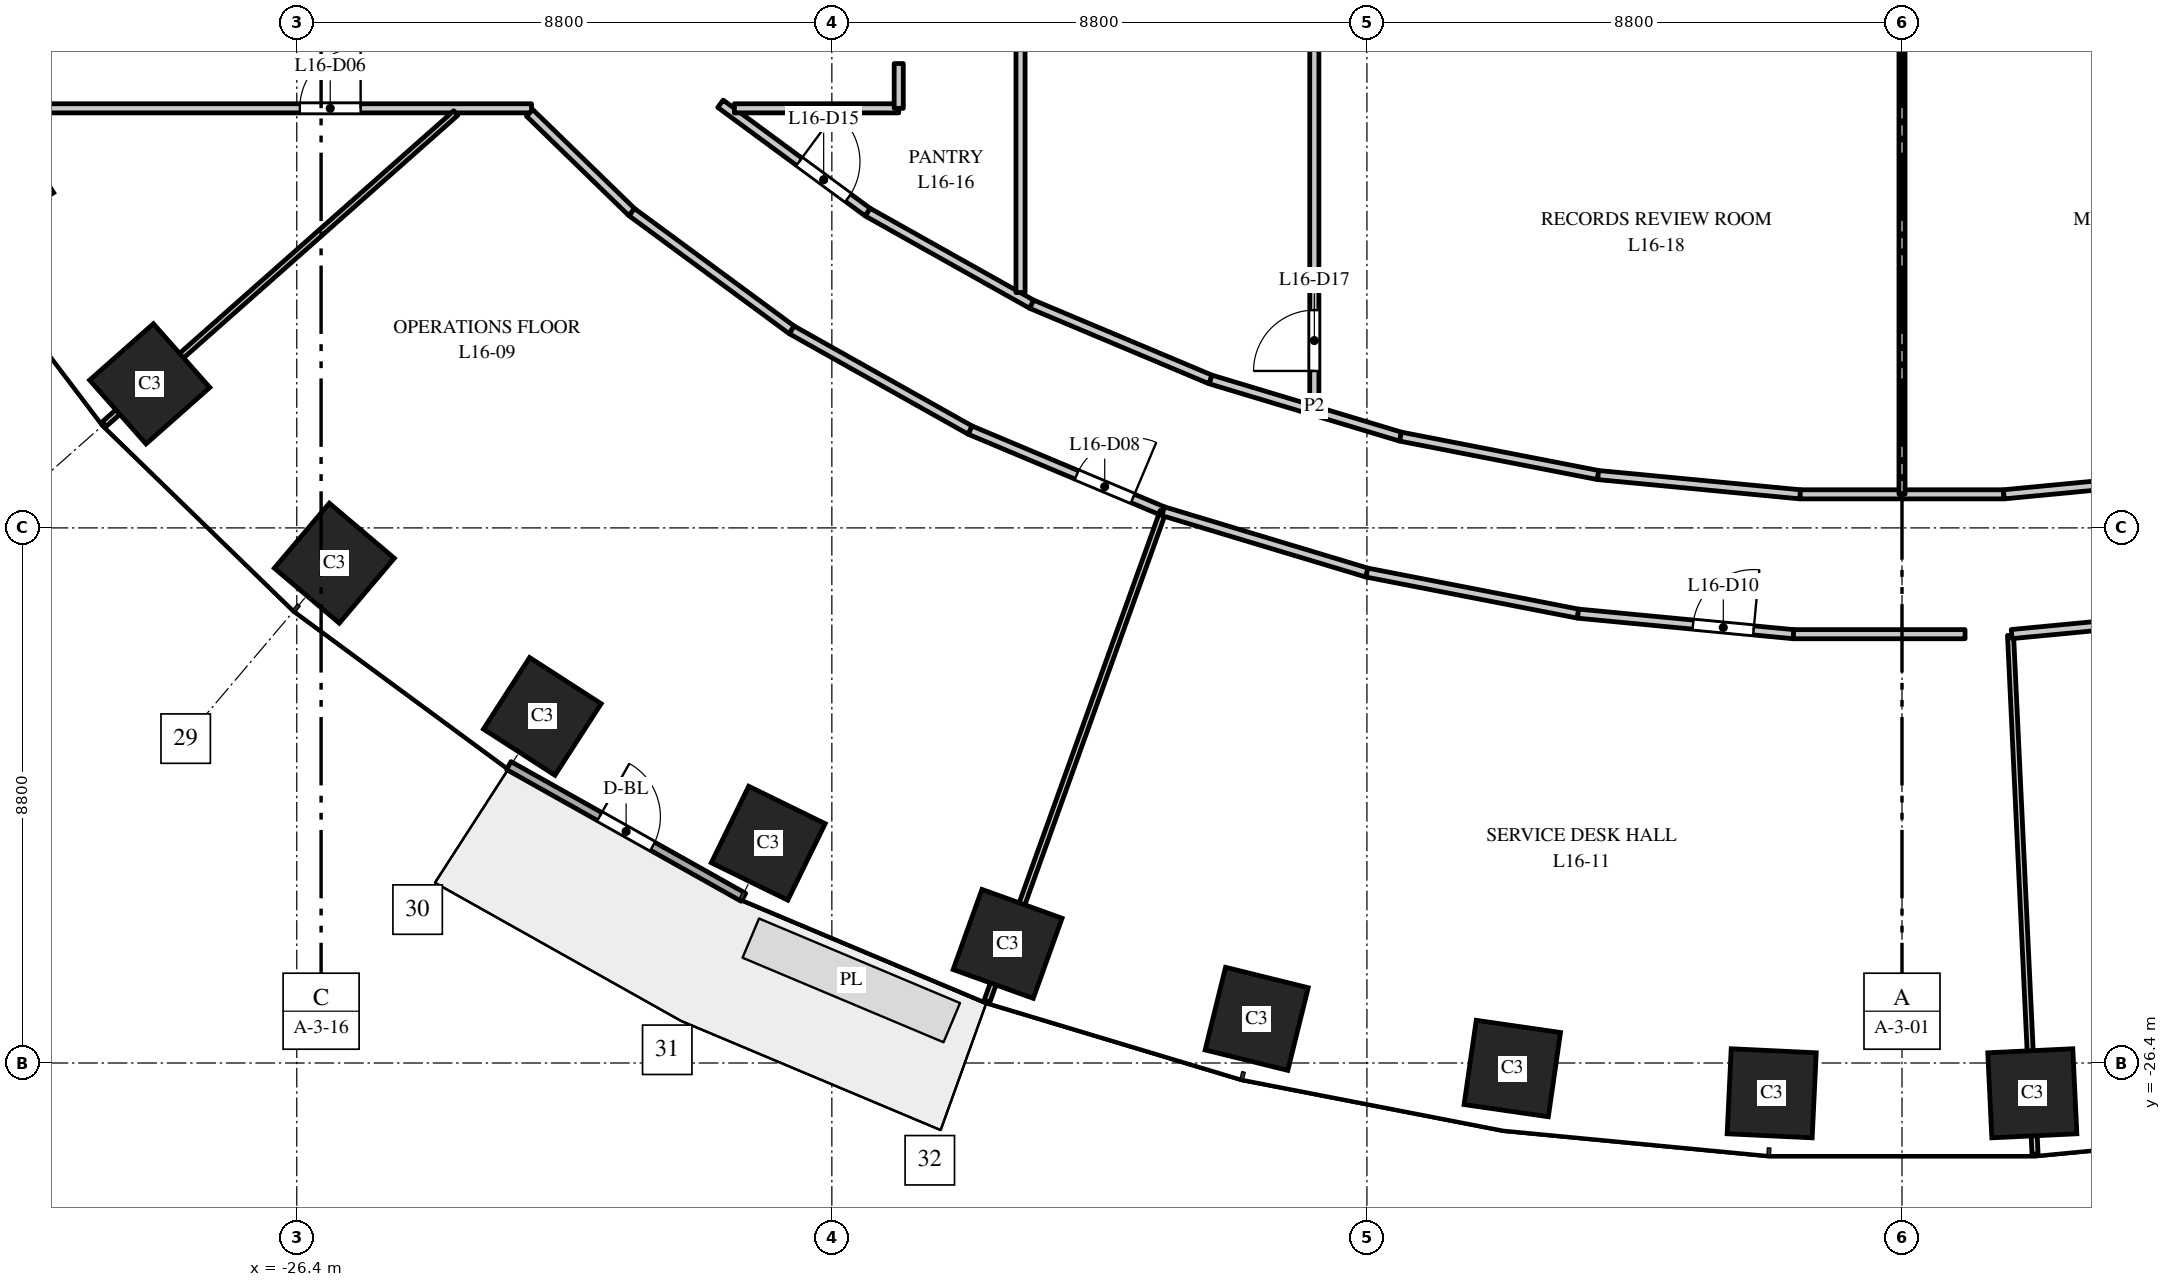
"""IFC4 building model, lengths in metres.
Left out: names, types, materials, properties, quantities, classifications, styles, units other than length and angle.
Written with IfcOpenShell. Run it as: python <this file> out.ifc"""

import sys

from ifc_helpers import new_model, si_unit, direction, frame, frame_2d, origin, origin_2d, place, context, subcontext, project, spatial, rectangle, extrude, element, fill, save


model = new_model("IFC4")
c1 = context("Model", 3, precision=1e-05, world=origin(), true_north=direction((0.0, 1.0)))
c2 = subcontext(c1, "Body", "Model", "MODEL_VIEW")
j1 = project(units=[si_unit("LENGTHUNIT", "METRE"), si_unit("PLANEANGLEUNIT", "RADIAN")], contexts=[c1])
p1 = place(None, origin())
s1 = spatial("IfcSite", under=j1, at=p1, CompositionType="ELEMENT")
p2 = place(p1, origin())
s2 = spatial("IfcBuilding", under=s1, at=p2, CompositionType="ELEMENT")
p3 = place(p2, frame((0.0, 0.0, 74.5)))
s3 = spatial("IfcBuildingStorey", under=s2, at=p3, CompositionType="ELEMENT", Elevation=74.5)
for number, where, z_axis, x_axis in (
    (1, (-31.365, -11.871, 0.0), (0.0, 0.0, 1.0), (0.535, -0.845, 0.0)),
    (2, (-28.819, -15.23, 0.0), (0.0, 0.0, 1.0), (0.663, -0.749, 0.0)),
    (3, (-25.783, -18.18, 0.0), (0.0, 0.0, 1.0), (0.763, -0.646, 0.0)),
    (4, (-22.362, -20.7, 0.0), (0.0, 0.0, 1.0), (0.84, -0.542, 0.0)),
    (5, (-18.646, -22.785, 0.0), (0.0, 0.0, 1.0), (0.898, -0.439, 0.0)),
    (6, (-14.709, -24.441, 0.0), (0.0, 0.0, 1.0), (0.941, -0.338, 0.0)),
    (7, (-10.613, -25.674, 0.0), (0.0, 0.0, 1.0), (0.971, -0.24, 0.0)),
    (8, (-6.409, -26.491, 0.0), (0.0, 0.0, 1.0), (0.99, -0.143, 0.0)),
    (9, (-2.143, -26.898, 0.0), (0.0, 0.0, 1.0), (0.999, -0.048, 0.0)),
    (10, (2.143, -26.898, 0.0), (0.0, 0.0, 1.0), (0.999, 0.048, 0.0)),
):
    element("IfcColumn", number, at=place(p3, frame(where, z_axis=z_axis, x_axis=x_axis)), inside=s3, PredefinedType="COLUMN", context=c2, shape_type="SweptSolid", body=[
        extrude(rectangle(XDim=1.4, YDim=1.4, at=origin_2d()), origin(), (0.0, 0.0, 1.0), 4.0),
    ])
p4 = place(p3, frame((-22.913, -21.509, 0.0), z_axis=(0.0, 0.0, 1.0), x_axis=(0.872046572975, -0.489422899509, 0.0)))
e11 = element("IfcWall", 11, at=p4, inside=s3, PredefinedType="STANDARD", context=c2, shape_type="SweptSolid", body=[
    extrude(rectangle(XDim=4.426, YDim=0.15, at=frame_2d((2.213, 0.0))), origin(), (0.0, 0.0, 1.0), 3.7),
])
p5 = place(p4, frame((1.713, 0.0, 0.0)))
e12 = element("IfcOpeningElement", 12, at=p5, cuts=e11, PredefinedType="OPENING", context=c2, shape_type="SweptSolid", body=[
    extrude(rectangle(XDim=1.0, YDim=2.4, at=frame_2d((0.5, 1.2))), frame((0.0, 0.085, 0.0), z_axis=(0.0, -1.0, 0.0), x_axis=(1.0, 0.0, 0.0)), (0.0, 0.0, 1.0), 0.17),
])
p6 = place(p3, frame((-31.5, -10.7, 0.0), z_axis=(0.0, 0.0, 1.0), x_axis=(1.0, 0.0, 0.0)))
e13 = element("IfcWall", 13, at=p6, inside=s3, PredefinedType="PARTITIONING", context=c2, shape_type="SweptSolid", body=[
    extrude(rectangle(XDim=8.961, YDim=0.15, at=frame_2d((4.48, 0.0))), origin(), (0.0, 0.0, 1.0), 3.1),
])
p7 = place(p6, frame((5.15, 0.0, 0.0)))
e14 = element("IfcOpeningElement", 14, at=p7, cuts=e13, PredefinedType="OPENING", context=c2, shape_type="SweptSolid", body=[
    extrude(rectangle(XDim=1.0, YDim=2.1, at=frame_2d((0.5, 1.05))), frame((0.0, 0.085, 0.0), z_axis=(0.0, -1.0, 0.0), x_axis=(1.0, 0.0, 0.0)), (0.0, 0.0, 1.0), 0.17),
])
p8 = place(p3, frame((-29.569, -15.895, 0.0), z_axis=(0.0, 0.0, 1.0), x_axis=(0.748985701008, 0.662586160198, 0.0)))
e15 = element("IfcWall", 15, at=p8, inside=s3, PredefinedType="PARTITIONING", context=c2, shape_type="SweptSolid", body=[
    extrude(rectangle(XDim=7.723, YDim=0.1, at=frame_2d((3.861, 0.0))), origin(), (0.0, 0.0, 1.0), 2.85),
])
p9 = place(p3, frame((-22.57, -10.775, 0.0), z_axis=(0.0, 0.0, 1.0), x_axis=(0.717045582263, -0.697026278527, 0.0)))
e16 = element("IfcWall", 16, at=p9, inside=s3, PredefinedType="PARTITIONING", context=c2, shape_type="SweptSolid", body=[
    extrude(rectangle(XDim=2.342, YDim=0.15, at=frame_2d((1.171, 0.0))), origin(), (0.0, 0.0, 1.0), 3.7),
])
p10 = place(p3, frame((-20.891, -12.407, 0.0), z_axis=(0.0, 0.0, 1.0), x_axis=(0.805303685339, -0.592862525701, 0.0)))
e17 = element("IfcWall", 17, at=p10, inside=s3, PredefinedType="PARTITIONING", context=c2, shape_type="SweptSolid", body=[
    extrude(rectangle(XDim=3.267, YDim=0.15, at=frame_2d((1.634, 0.0))), origin(), (0.0, 0.0, 1.0), 2.75),
])
p11 = place(p3, frame((-19.432, -10.625, 0.0), z_axis=(0.0, 0.0, 1.0), x_axis=(0.805306738654, -0.592858378265, 0.0)))
e18 = element("IfcWall", 18, at=p11, inside=s3, PredefinedType="PARTITIONING", context=c2, shape_type="SweptSolid", body=[
    extrude(rectangle(XDim=3.007, YDim=0.15, at=frame_2d((1.504, 0.0))), origin(), (0.0, 0.0, 1.0), 2.75),
])
p12 = place(p11, frame((1.607, 0.0, 0.0)))
e19 = element("IfcOpeningElement", 19, at=p12, cuts=e18, PredefinedType="OPENING", context=c2, shape_type="SweptSolid", body=[
    extrude(rectangle(XDim=1.0, YDim=2.1, at=frame_2d((0.5, 1.05))), frame((0.0, 0.085, 0.0), z_axis=(0.0, -1.0, 0.0), x_axis=(1.0, 0.0, 0.0)), (0.0, 0.0, 1.0), 0.17),
])
p13 = place(p3, frame((-19.203, -10.7, 0.0), z_axis=(0.0, 0.0, 1.0), x_axis=(1.0, 0.0, 0.0)))
e20 = element("IfcWall", 20, at=p13, inside=s3, PredefinedType="PARTITIONING", context=c2, shape_type="SweptSolid", body=[
    extrude(rectangle(XDim=2.703, YDim=0.15, at=frame_2d((1.352, 0.0))), origin(), (0.0, 0.0, 1.0), 3.7),
])
p14 = place(p3, frame((-18.26, -14.344, 0.0), z_axis=(0.0, 0.0, 1.0), x_axis=(0.871958798398, -0.489579262118, 0.0)))
e21 = element("IfcWall", 21, at=p14, inside=s3, PredefinedType="PARTITIONING", context=c2, shape_type="SweptSolid", body=[
    extrude(rectangle(XDim=3.366, YDim=0.15, at=frame_2d((1.683, 0.0))), origin(), (0.0, 0.0, 1.0), 3.7),
])
p15 = place(p3, frame((-17.01, -12.408, 0.0), z_axis=(0.0, 0.0, 1.0), x_axis=(0.871977874087, -0.489545286059, 0.0)))
e22 = element("IfcWall", 22, at=p15, inside=s3, PredefinedType="PARTITIONING", context=c2, shape_type="SweptSolid", body=[
    extrude(rectangle(XDim=3.093, YDim=0.15, at=frame_2d((1.546, 0.0))), origin(), (0.0, 0.0, 1.0), 3.7),
])
p16 = place(p3, frame((-16.5, -10.7, 0.0), z_axis=(0.0, 0.0, 1.0), x_axis=(0.0, 1.0, 0.0)))
e23 = element("IfcWall", 23, at=p16, inside=s3, PredefinedType="PARTITIONING", context=c2, shape_type="SweptSolid", body=[
    extrude(rectangle(XDim=0.736, YDim=0.15, at=frame_2d((0.368, 0.0))), origin(), (0.0, 0.0, 1.0), 3.7),
])
p17 = place(p3, frame((-15.325, -15.992, 0.0), z_axis=(0.0, 0.0, 1.0), x_axis=(0.921891448612, -0.387448263612, 0.0)))
e24 = element("IfcWall", 24, at=p17, inside=s3, PredefinedType="PARTITIONING", context=c2, shape_type="SweptSolid", body=[
    extrude(rectangle(XDim=3.443, YDim=0.15, at=frame_2d((1.722, 0.0))), origin(), (0.0, 0.0, 1.0), 2.85),
])
p18 = place(p17, frame((1.9, 0.0, 0.0)))
e25 = element("IfcOpeningElement", 25, at=p18, cuts=e24, PredefinedType="OPENING", context=c2, shape_type="SweptSolid", body=[
    extrude(rectangle(XDim=1.0, YDim=2.1, at=frame_2d((0.5, 1.05))), frame((0.0, 0.085, 0.0), z_axis=(0.0, -1.0, 0.0), x_axis=(1.0, 0.0, 0.0)), (0.0, 0.0, 1.0), 0.17),
])
p19 = place(p3, frame((-15.048, -25.383, 0.0), z_axis=(0.0, 0.0, 1.0), x_axis=(0.338300183564, 0.941038248851, 0.0)))
e26 = element("IfcWall", 26, at=p19, inside=s3, PredefinedType="PARTITIONING", context=c2, shape_type="SweptSolid", body=[
    extrude(rectangle(XDim=8.558, YDim=0.1, at=frame_2d((4.279, 0.0))), origin(), (0.0, 0.0, 1.0), 2.85),
])
p20 = place(p3, frame((-14.497, -13.729, 0.0), z_axis=(0.0, 0.0, 1.0), x_axis=(0.0, 1.0, 0.0)))
e27 = element("IfcWall", 27, at=p20, inside=s3, PredefinedType="PARTITIONING", context=c2, shape_type="SweptSolid", body=[
    extrude(rectangle(XDim=4.654, YDim=0.15, at=frame_2d((2.327, 0.0))), origin(), (0.0, 0.0, 1.0), 2.75),
])
p21 = place(p3, frame((-14.313, -13.922, 0.0), z_axis=(0.0, 0.0, 1.0), x_axis=(0.921799502591, -0.387666966638, 0.0)))
e28 = element("IfcWall", 28, at=p21, inside=s3, PredefinedType="PARTITIONING", context=c2, shape_type="SweptSolid", body=[
    extrude(rectangle(XDim=3.19, YDim=0.15, at=frame_2d((1.595, 0.0))), origin(), (0.0, 0.0, 1.0), 2.85),
])
p22 = place(p3, frame((-12.151, -17.326, 0.0), z_axis=(0.0, 0.0, 1.0), x_axis=(0.957528149021, -0.288339806186, 0.0)))
e29 = element("IfcWall", 29, at=p22, inside=s3, PredefinedType="PARTITIONING", context=c2, shape_type="SweptSolid", body=[
    extrude(rectangle(XDim=3.5, YDim=0.15, at=frame_2d((1.75, 0.0))), origin(), (0.0, 0.0, 1.0), 3.7),
])
p23 = place(p3, frame((-11.372, -15.159, 0.0), z_axis=(0.0, 0.0, 1.0), x_axis=(0.95757464185, -0.28818536619, 0.0)))
e30 = element("IfcWall", 30, at=p23, inside=s3, PredefinedType="PARTITIONING", context=c2, shape_type="SweptSolid", body=[
    extrude(rectangle(XDim=3.262, YDim=0.15, at=frame_2d((1.631, 0.0))), origin(), (0.0, 0.0, 1.0), 3.7),
])
p24 = place(p3, frame((-9.665, -15.591, 0.0), z_axis=(0.0, 0.0, 1.0), x_axis=(0.0, 1.0, 0.0)))
e31 = element("IfcWall", 31, at=p24, inside=s3, PredefinedType="PARTITIONING", context=c2, shape_type="SweptSolid", body=[
    extrude(rectangle(XDim=31.182, YDim=0.15, at=frame_2d((15.591, 0.0))), origin(), (0.0, 0.0, 1.0), 2.75),
])
p25 = place(p24, frame((0.572, 0.0, 0.0)))
e32 = element("IfcOpeningElement", 32, at=p25, cuts=e31, PredefinedType="OPENING", context=c2, shape_type="SweptSolid", body=[
    extrude(rectangle(XDim=1.0, YDim=2.1, at=frame_2d((0.5, 1.05))), frame((0.0, 0.085, 0.0), z_axis=(0.0, -1.0, 0.0), x_axis=(1.0, 0.0, 0.0)), (0.0, 0.0, 1.0), 0.17),
])
p26 = place(p3, frame((-8.8, -18.335, 0.0), z_axis=(0.0, 0.0, 1.0), x_axis=(0.981620418387, -0.190843795306, 0.0)))
e33 = element("IfcWall", 33, at=p26, inside=s3, PredefinedType="PARTITIONING", context=c2, shape_type="SweptSolid", body=[
    extrude(rectangle(XDim=3.537, YDim=0.15, at=frame_2d((1.769, 0.0))), origin(), (0.0, 0.0, 1.0), 2.85),
])
p27 = place(p3, frame((-8.248, -16.099, 0.0), z_axis=(0.0, 0.0, 1.0), x_axis=(0.981621529558, -0.190838079815, 0.0)))
e34 = element("IfcWall", 34, at=p27, inside=s3, PredefinedType="PARTITIONING", context=c2, shape_type="SweptSolid", body=[
    extrude(rectangle(XDim=3.311, YDim=0.15, at=frame_2d((1.655, 0.0))), origin(), (0.0, 0.0, 1.0), 2.85),
])
p28 = place(p3, frame((-5.328, -19.01, 0.0), z_axis=(0.0, 0.0, 1.0), x_axis=(0.995485604231, -0.094912653366, 0.0)))
e35 = element("IfcWall", 35, at=p28, inside=s3, PredefinedType="PARTITIONING", context=c2, shape_type="SweptSolid", body=[
    extrude(rectangle(XDim=3.56, YDim=0.15, at=frame_2d((1.78, 0.0))), origin(), (0.0, 0.0, 1.0), 3.7),
])
p29 = place(p28, frame((1.9, 0.0, 0.0)))
e36 = element("IfcOpeningElement", 36, at=p29, cuts=e35, PredefinedType="OPENING", context=c2, shape_type="SweptSolid", body=[
    extrude(rectangle(XDim=1.0, YDim=2.1, at=frame_2d((0.5, 1.05))), frame((0.0, 0.085, 0.0), z_axis=(0.0, -1.0, 0.0), x_axis=(1.0, 0.0, 0.0)), (0.0, 0.0, 1.0), 0.17),
])
p30 = place(p3, frame((-4.998, -16.731, 0.0), z_axis=(0.0, 0.0, 1.0), x_axis=(0.995479356205, -0.094978162593, 0.0)))
e37 = element("IfcWall", 37, at=p30, inside=s3, PredefinedType="PARTITIONING", context=c2, shape_type="SweptSolid", body=[
    extrude(rectangle(XDim=3.339, YDim=0.15, at=frame_2d((1.669, 0.0))), origin(), (0.0, 0.0, 1.0), 3.7),
])
p31 = place(p3, frame((-1.784, -19.348, 0.0), z_axis=(0.0, 0.0, 1.0), x_axis=(1.0, 0.0, 0.0)))
e38 = element("IfcWall", 38, at=p31, inside=s3, PredefinedType="PARTITIONING", context=c2, shape_type="SweptSolid", body=[
    extrude(rectangle(XDim=2.821, YDim=0.15, at=frame_2d((1.411, 0.0))), origin(), (0.0, 0.0, 1.0), 2.85),
])
p32 = place(p3, frame((-1.674, -17.048, 0.0), z_axis=(0.0, 0.0, 1.0), x_axis=(1.0, 0.0, 0.0)))
e39 = element("IfcWall", 39, at=p32, inside=s3, PredefinedType="PARTITIONING", context=c2, shape_type="SweptSolid", body=[
    extrude(rectangle(XDim=1.654, YDim=0.15, at=frame_2d((0.827, 0.0))), origin(), (0.0, 0.0, 1.0), 2.85),
])
p33 = place(p3, frame((0.0, -17.048, 0.0), z_axis=(0.0, 0.0, 1.0), x_axis=(1.0, 0.0, 0.0)))
e40 = element("IfcWall", 40, at=p33, inside=s3, PredefinedType="PARTITIONING", context=c2, shape_type="SweptSolid", body=[
    extrude(rectangle(XDim=1.674, YDim=0.15, at=frame_2d((0.837, 0.0))), origin(), (0.0, 0.0, 1.0), 3.7),
])
p34 = place(p3, frame((0.0, -17.044, 0.0), z_axis=(0.0, 0.0, 1.0), x_axis=(0.0, 1.0, 0.0)))
e41 = element("IfcWall", 41, at=p34, inside=s3, PredefinedType="PARTITIONING", context=c2, shape_type="SweptSolid", body=[
    extrude(rectangle(XDim=9.54, YDim=0.1, at=frame_2d((4.77, 0.0))), origin(), (0.0, 0.0, 1.0), 3.7),
])
p35 = place(p3, frame((1.674, -17.048, 0.0), z_axis=(0.0, 0.0, 1.0), x_axis=(0.995479356205, 0.094978162593, 0.0)))
e42 = element("IfcWall", 42, at=p35, inside=s3, PredefinedType="PARTITIONING", context=c2, shape_type="SweptSolid", body=[
    extrude(rectangle(XDim=3.339, YDim=0.15, at=frame_2d((1.669, 0.0))), origin(), (0.0, 0.0, 1.0), 2.85),
])
p36 = place(p3, frame((1.785, -19.366, 0.0), z_axis=(0.0, 0.0, 1.0), x_axis=(0.047190335266, -0.998885915537, 0.0)))
e43 = element("IfcWall", 43, at=p36, inside=s3, PredefinedType="PARTITIONING", context=c2, shape_type="SweptSolid", body=[
    extrude(rectangle(XDim=8.542, YDim=0.1, at=frame_2d((4.271, 0.0))), origin(), (0.0, 0.0, 1.0), 2.85),
])
p37 = place(p3, frame((1.804, -19.346, 0.0), z_axis=(0.0, 0.0, 1.0), x_axis=(0.99548678928, 0.094900223226, 0.0)))
e44 = element("IfcWall", 44, at=p37, inside=s3, PredefinedType="PARTITIONING", context=c2, shape_type="SweptSolid", body=[
    extrude(rectangle(XDim=3.54, YDim=0.15, at=frame_2d((1.77, 0.0))), origin(), (0.0, 0.0, 1.0), 2.85),
])
p38 = place(p5, origin())
e45 = element("IfcDoor", 45, at=p38, inside=s3, OperationType="SINGLE_SWING_LEFT", PredefinedType="DOOR", context=c2, shape_type="SweptSolid", body=[
    extrude(rectangle(XDim=1.0, YDim=2.4, at=frame_2d((0.5, 1.2))), frame((0.0, 0.025, 0.0), z_axis=(0.0, -1.0, 0.0), x_axis=(1.0, 0.0, 0.0)), (0.0, 0.0, 1.0), 0.05),
])
fill(e12, e45)
p39 = place(p7, origin())
e46 = element("IfcDoor", 46, at=p39, inside=s3, OperationType="SINGLE_SWING_RIGHT", PredefinedType="DOOR", context=c2, shape_type="SweptSolid", body=[
    extrude(rectangle(XDim=1.0, YDim=2.1, at=frame_2d((0.5, 1.05))), frame((0.0, 0.025, 0.0), z_axis=(0.0, -1.0, 0.0), x_axis=(1.0, 0.0, 0.0)), (0.0, 0.0, 1.0), 0.05),
])
fill(e14, e46)
p40 = place(p18, origin())
e47 = element("IfcDoor", 47, at=p40, inside=s3, OperationType="SINGLE_SWING_RIGHT", PredefinedType="DOOR", context=c2, shape_type="SweptSolid", body=[
    extrude(rectangle(XDim=1.0, YDim=2.1, at=frame_2d((0.5, 1.05))), frame((0.0, 0.025, 0.0), z_axis=(0.0, -1.0, 0.0), x_axis=(1.0, 0.0, 0.0)), (0.0, 0.0, 1.0), 0.05),
])
fill(e25, e47)
p41 = place(p29, origin())
e48 = element("IfcDoor", 48, at=p41, inside=s3, OperationType="SINGLE_SWING_RIGHT", PredefinedType="DOOR", context=c2, shape_type="SweptSolid", body=[
    extrude(rectangle(XDim=1.0, YDim=2.1, at=frame_2d((0.5, 1.05))), frame((0.0, 0.025, 0.0), z_axis=(0.0, -1.0, 0.0), x_axis=(1.0, 0.0, 0.0)), (0.0, 0.0, 1.0), 0.05),
])
fill(e36, e48)
p42 = place(p12, origin())
e49 = element("IfcDoor", 49, at=p42, inside=s3, OperationType="SINGLE_SWING_LEFT", PredefinedType="DOOR", context=c2, shape_type="SweptSolid", body=[
    extrude(rectangle(XDim=1.0, YDim=2.1, at=frame_2d((0.5, 1.05))), frame((0.0, 0.025, 0.0), z_axis=(0.0, -1.0, 0.0), x_axis=(1.0, 0.0, 0.0)), (0.0, 0.0, 1.0), 0.05),
])
fill(e19, e49)
p43 = place(p25, origin())
e50 = element("IfcDoor", 50, at=p43, inside=s3, OperationType="SINGLE_SWING_LEFT", PredefinedType="DOOR", context=c2, shape_type="SweptSolid", body=[
    extrude(rectangle(XDim=1.0, YDim=2.1, at=frame_2d((0.5, 1.05))), frame((0.0, 0.025, 0.0), z_axis=(0.0, -1.0, 0.0), x_axis=(1.0, 0.0, 0.0)), (0.0, 0.0, 1.0), 0.05),
])
fill(e32, e50)
save(model, sys.argv[1])
